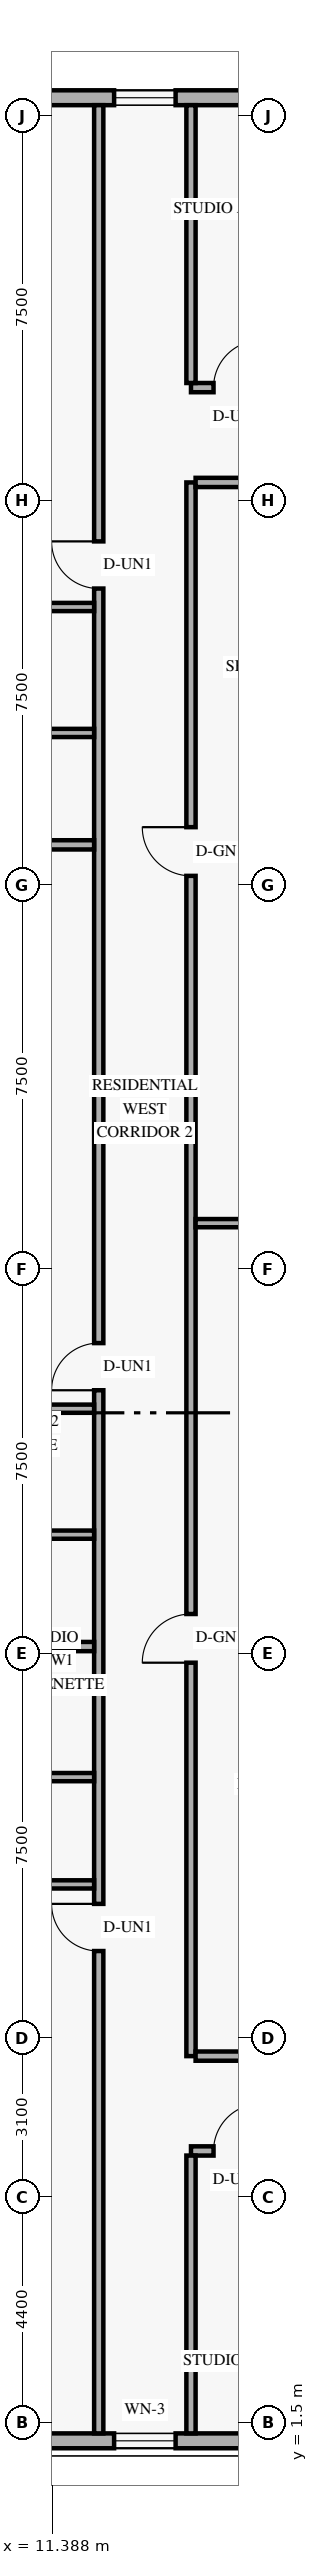
"""IFC4 building model, lengths in metres.
Left out: names, types, materials, properties, quantities, classifications, styles, units other than length and angle.
Written with IfcOpenShell. Run it as: python <this file> out.ifc"""

import sys

from ifc_helpers import new_model, si_unit, direction, frame, frame_2d, origin, place, context, subcontext, project, spatial, rectangle, extrude, element, fill, save


model = new_model("IFC4")
c1 = context("Model", 3, precision=1e-05, world=origin(), true_north=direction((0.0, 1.0)))
c2 = subcontext(c1, "Body", "Model", "MODEL_VIEW")
j1 = project(units=[si_unit("LENGTHUNIT", "METRE"), si_unit("PLANEANGLEUNIT", "RADIAN")], contexts=[c1])
p1 = place(None, origin())
s1 = spatial("IfcSite", under=j1, at=p1, CompositionType="ELEMENT")
p2 = place(p1, origin())
s2 = spatial("IfcBuilding", under=s1, at=p2, CompositionType="ELEMENT")
p3 = place(p2, frame((0.0, 0.0, 64.2)))
s3 = spatial("IfcBuildingStorey", under=s2, at=p3, CompositionType="ELEMENT", Elevation=64.2)
p4 = place(p3, frame((5.42, 1.145, 0.0), z_axis=(0.0, 0.0, 1.0), x_axis=(1.0, 0.0, 0.0)))
e1 = element("IfcWall", 1, at=p4, inside=s3, PredefinedType="SOLIDWALL", context=c2, shape_type="SweptSolid", body=[
    extrude(rectangle(XDim=39.56, YDim=0.29, at=frame_2d((19.78, 0.0))), origin(), (0.0, 0.0, 1.0), 3.36),
])
p5 = place(p4, frame((2.615, 0.0, 0.85)))
e2 = element("IfcOpeningElement", 2, at=p5, cuts=e1, PredefinedType="OPENING", context=c2, shape_type="SweptSolid", body=[
    extrude(rectangle(XDim=1.65, YDim=1.6, at=frame_2d((0.825, 0.8))), frame((0.0, 0.155, 0.0), z_axis=(0.0, -1.0, 0.0), x_axis=(1.0, 0.0, 0.0)), (0.0, 0.0, 1.0), 0.31),
])
p6 = place(p4, frame((7.18, 0.0, 0.85)))
e3 = element("IfcOpeningElement", 3, at=p6, cuts=e1, PredefinedType="OPENING", context=c2, shape_type="SweptSolid", body=[
    extrude(rectangle(XDim=1.2, YDim=1.5, at=frame_2d((0.6, 0.75))), frame((0.0, 0.155, 0.0), z_axis=(0.0, -1.0, 0.0), x_axis=(1.0, 0.0, 0.0)), (0.0, 0.0, 1.0), 0.31),
])
p7 = place(p4, frame((11.906, 0.0, 0.85)))
e4 = element("IfcOpeningElement", 4, at=p7, cuts=e1, PredefinedType="OPENING", context=c2, shape_type="SweptSolid", body=[
    extrude(rectangle(XDim=1.65, YDim=1.6, at=frame_2d((0.825, 0.8))), frame((0.0, 0.155, 0.0), z_axis=(0.0, -1.0, 0.0), x_axis=(1.0, 0.0, 0.0)), (0.0, 0.0, 1.0), 0.31),
])
p8 = place(p4, frame((18.515, 0.0, 0.85)))
e5 = element("IfcOpeningElement", 5, at=p8, cuts=e1, PredefinedType="OPENING", context=c2, shape_type="SweptSolid", body=[
    extrude(rectangle(XDim=1.65, YDim=1.6, at=frame_2d((0.825, 0.8))), frame((0.0, 0.155, 0.0), z_axis=(0.0, -1.0, 0.0), x_axis=(1.0, 0.0, 0.0)), (0.0, 0.0, 1.0), 0.31),
])
p9 = place(p4, frame((25.124, 0.0, 0.85)))
e6 = element("IfcOpeningElement", 6, at=p9, cuts=e1, PredefinedType="OPENING", context=c2, shape_type="SweptSolid", body=[
    extrude(rectangle(XDim=1.65, YDim=1.6, at=frame_2d((0.825, 0.8))), frame((0.0, 0.155, 0.0), z_axis=(0.0, -1.0, 0.0), x_axis=(1.0, 0.0, 0.0)), (0.0, 0.0, 1.0), 0.31),
])
p10 = place(p4, frame((30.465, 0.0, 0.85)))
e7 = element("IfcOpeningElement", 7, at=p10, cuts=e1, PredefinedType="OPENING", context=c2, shape_type="SweptSolid", body=[
    extrude(rectangle(XDim=1.2, YDim=1.5, at=frame_2d((0.6, 0.75))), frame((0.0, 0.155, 0.0), z_axis=(0.0, -1.0, 0.0), x_axis=(1.0, 0.0, 0.0)), (0.0, 0.0, 1.0), 0.31),
])
p11 = place(p4, frame((35.02, 0.0, 0.85)))
e8 = element("IfcOpeningElement", 8, at=p11, cuts=e1, PredefinedType="OPENING", context=c2, shape_type="SweptSolid", body=[
    extrude(rectangle(XDim=1.65, YDim=1.6, at=frame_2d((0.825, 0.8))), frame((0.0, 0.155, 0.0), z_axis=(0.0, -1.0, 0.0), x_axis=(1.0, 0.0, 0.0)), (0.0, 0.0, 1.0), 0.31),
])
p12 = place(p3, frame((44.98, 46.855, 0.0), z_axis=(0.0, 0.0, 1.0), x_axis=(-1.0, 0.0, 0.0)))
e9 = element("IfcWall", 9, at=p12, inside=s3, PredefinedType="SOLIDWALL", context=c2, shape_type="SweptSolid", body=[
    extrude(rectangle(XDim=39.56, YDim=0.29, at=frame_2d((19.78, 0.0))), origin(), (0.0, 0.0, 1.0), 3.36),
])
p13 = place(p12, frame((35.295, 0.0, 0.85)))
e10 = element("IfcOpeningElement", 10, at=p13, cuts=e9, PredefinedType="OPENING", context=c2, shape_type="SweptSolid", body=[
    extrude(rectangle(XDim=1.65, YDim=1.6, at=frame_2d((0.825, 0.8))), frame((0.0, 0.155, 0.0), z_axis=(0.0, -1.0, 0.0), x_axis=(1.0, 0.0, 0.0)), (0.0, 0.0, 1.0), 0.31),
])
p14 = place(p12, frame((31.18, 0.0, 0.85)))
e11 = element("IfcOpeningElement", 11, at=p14, cuts=e9, PredefinedType="OPENING", context=c2, shape_type="SweptSolid", body=[
    extrude(rectangle(XDim=1.2, YDim=1.5, at=frame_2d((0.6, 0.75))), frame((0.0, 0.155, 0.0), z_axis=(0.0, -1.0, 0.0), x_axis=(1.0, 0.0, 0.0)), (0.0, 0.0, 1.0), 0.31),
])
p15 = place(p12, frame((25.684, 0.0, 0.85)))
e12 = element("IfcOpeningElement", 12, at=p15, cuts=e9, PredefinedType="OPENING", context=c2, shape_type="SweptSolid", body=[
    extrude(rectangle(XDim=1.65, YDim=1.6, at=frame_2d((0.825, 0.8))), frame((0.0, 0.155, 0.0), z_axis=(0.0, -1.0, 0.0), x_axis=(1.0, 0.0, 0.0)), (0.0, 0.0, 1.0), 0.31),
])
p16 = place(p12, frame((18.649, 0.0, 0.85)))
e13 = element("IfcOpeningElement", 13, at=p16, cuts=e9, PredefinedType="OPENING", context=c2, shape_type="SweptSolid", body=[
    extrude(rectangle(XDim=1.65, YDim=1.6, at=frame_2d((0.825, 0.8))), frame((0.0, 0.155, 0.0), z_axis=(0.0, -1.0, 0.0), x_axis=(1.0, 0.0, 0.0)), (0.0, 0.0, 1.0), 0.31),
])
p17 = place(p12, frame((12.359, 0.0, 0.85)))
e14 = element("IfcOpeningElement", 14, at=p17, cuts=e9, PredefinedType="OPENING", context=c2, shape_type="SweptSolid", body=[
    extrude(rectangle(XDim=1.65, YDim=1.6, at=frame_2d((0.825, 0.8))), frame((0.0, 0.155, 0.0), z_axis=(0.0, -1.0, 0.0), x_axis=(1.0, 0.0, 0.0)), (0.0, 0.0, 1.0), 0.31),
])
p18 = place(p12, frame((7.895, 0.0, 0.85)))
e15 = element("IfcOpeningElement", 15, at=p18, cuts=e9, PredefinedType="OPENING", context=c2, shape_type="SweptSolid", body=[
    extrude(rectangle(XDim=1.2, YDim=1.5, at=frame_2d((0.6, 0.75))), frame((0.0, 0.155, 0.0), z_axis=(0.0, -1.0, 0.0), x_axis=(1.0, 0.0, 0.0)), (0.0, 0.0, 1.0), 0.31),
])
p19 = place(p12, frame((2.89, 0.0, 0.85)))
e16 = element("IfcOpeningElement", 16, at=p19, cuts=e9, PredefinedType="OPENING", context=c2, shape_type="SweptSolid", body=[
    extrude(rectangle(XDim=1.65, YDim=1.6, at=frame_2d((0.825, 0.8))), frame((0.0, 0.155, 0.0), z_axis=(0.0, -1.0, 0.0), x_axis=(1.0, 0.0, 0.0)), (0.0, 0.0, 1.0), 0.31),
])
p20 = place(p3, frame((14.1, 6.8, 0.0), z_axis=(0.0, 0.0, 1.0), x_axis=(1.0, 0.0, 0.0)))
e17 = element("IfcWall", 17, at=p20, inside=s3, PredefinedType="STANDARD", context=c2, shape_type="SweptSolid", body=[
    extrude(rectangle(XDim=21.32, YDim=0.18, at=frame_2d((10.66, 0.0))), origin(), (0.0, 0.0, 1.0), 2.649),
])
p21 = place(p20, frame((0.44, 0.0, 0.0)))
e18 = element("IfcOpeningElement", 18, at=p21, cuts=e17, PredefinedType="OPENING", context=c2, shape_type="SweptSolid", body=[
    extrude(rectangle(XDim=0.92, YDim=2.15, at=frame_2d((0.46, 1.075))), frame((0.0, 0.1, 0.0), z_axis=(0.0, -1.0, 0.0), x_axis=(1.0, 0.0, 0.0)), (0.0, 0.0, 1.0), 0.2),
])
p22 = place(p20, frame((8.582, 0.0, 0.0)))
e19 = element("IfcOpeningElement", 19, at=p22, cuts=e17, PredefinedType="OPENING", context=c2, shape_type="SweptSolid", body=[
    extrude(rectangle(XDim=0.95, YDim=2.15, at=frame_2d((0.475, 1.075))), frame((0.0, 0.1, 0.0), z_axis=(0.0, -1.0, 0.0), x_axis=(1.0, 0.0, 0.0)), (0.0, 0.0, 1.0), 0.2),
])
p23 = place(p20, frame((13.658, 0.0, 0.0)))
e20 = element("IfcOpeningElement", 20, at=p23, cuts=e17, PredefinedType="OPENING", context=c2, shape_type="SweptSolid", body=[
    extrude(rectangle(XDim=0.92, YDim=2.15, at=frame_2d((0.46, 1.075))), frame((0.0, 0.1, 0.0), z_axis=(0.0, -1.0, 0.0), x_axis=(1.0, 0.0, 0.0)), (0.0, 0.0, 1.0), 0.2),
])
p24 = place(p3, frame((14.1, 41.2, 0.0), z_axis=(0.0, 0.0, 1.0), x_axis=(1.0, 0.0, 0.0)))
e21 = element("IfcWall", 21, at=p24, inside=s3, PredefinedType="STANDARD", context=c2, shape_type="SweptSolid", body=[
    extrude(rectangle(XDim=21.32, YDim=0.18, at=frame_2d((10.66, 0.0))), origin(), (0.0, 0.0, 1.0), 2.649),
])
p25 = place(p24, frame((0.44, 0.0, 0.0)))
e22 = element("IfcOpeningElement", 22, at=p25, cuts=e21, PredefinedType="OPENING", context=c2, shape_type="SweptSolid", body=[
    extrude(rectangle(XDim=0.92, YDim=2.15, at=frame_2d((0.46, 1.075))), frame((0.0, 0.1, 0.0), z_axis=(0.0, -1.0, 0.0), x_axis=(1.0, 0.0, 0.0)), (0.0, 0.0, 1.0), 0.2),
])
p26 = place(p24, frame((10.631, 0.0, 0.0)))
e23 = element("IfcOpeningElement", 23, at=p26, cuts=e21, PredefinedType="OPENING", context=c2, shape_type="SweptSolid", body=[
    extrude(rectangle(XDim=0.95, YDim=2.15, at=frame_2d((0.475, 1.075))), frame((0.0, 0.1, 0.0), z_axis=(0.0, -1.0, 0.0), x_axis=(1.0, 0.0, 0.0)), (0.0, 0.0, 1.0), 0.2),
])
p27 = place(p24, frame((14.511, 0.0, 0.0)))
e24 = element("IfcOpeningElement", 24, at=p27, cuts=e21, PredefinedType="OPENING", context=c2, shape_type="SweptSolid", body=[
    extrude(rectangle(XDim=0.92, YDim=2.15, at=frame_2d((0.46, 1.075))), frame((0.0, 0.1, 0.0), z_axis=(0.0, -1.0, 0.0), x_axis=(1.0, 0.0, 0.0)), (0.0, 0.0, 1.0), 0.2),
])
p28 = place(p3, frame((12.3, 1.29, 0.0), z_axis=(0.0, 0.0, 1.0), x_axis=(0.0, 1.0, 0.0)))
e25 = element("IfcWall", 25, at=p28, inside=s3, PredefinedType="STANDARD", context=c2, shape_type="SweptSolid", body=[
    extrude(rectangle(XDim=45.42, YDim=0.18, at=frame_2d((22.71, 0.0))), origin(), (0.0, 0.0, 1.0), 2.649),
])
p29 = place(p28, frame((9.41, 0.0, 0.0)))
e26 = element("IfcOpeningElement", 26, at=p29, cuts=e25, PredefinedType="OPENING", context=c2, shape_type="SweptSolid", body=[
    extrude(rectangle(XDim=0.92, YDim=2.15, at=frame_2d((0.46, 1.075))), frame((0.0, 0.1, 0.0), z_axis=(0.0, -1.0, 0.0), x_axis=(1.0, 0.0, 0.0)), (0.0, 0.0, 1.0), 0.2),
])
p30 = place(p28, frame((20.35, 0.0, 0.0)))
e27 = element("IfcOpeningElement", 27, at=p30, cuts=e25, PredefinedType="OPENING", context=c2, shape_type="SweptSolid", body=[
    extrude(rectangle(XDim=0.92, YDim=2.15, at=frame_2d((0.46, 1.075))), frame((0.0, 0.1, 0.0), z_axis=(0.0, -1.0, 0.0), x_axis=(1.0, 0.0, 0.0)), (0.0, 0.0, 1.0), 0.2),
])
p31 = place(p28, frame((35.99, 0.0, 0.0)))
e28 = element("IfcOpeningElement", 28, at=p31, cuts=e25, PredefinedType="OPENING", context=c2, shape_type="SweptSolid", body=[
    extrude(rectangle(XDim=0.92, YDim=2.15, at=frame_2d((0.46, 1.075))), frame((0.0, 0.1, 0.0), z_axis=(0.0, -1.0, 0.0), x_axis=(1.0, 0.0, 0.0)), (0.0, 0.0, 1.0), 0.2),
])
p32 = place(p3, frame((14.1, 8.65, 0.0), z_axis=(0.0, 0.0, 1.0), x_axis=(0.0, 1.0, 0.0)))
e29 = element("IfcWall", 29, at=p32, inside=s3, PredefinedType="STANDARD", context=c2, shape_type="SweptSolid", body=[
    extrude(rectangle(XDim=30.7, YDim=0.18, at=frame_2d((15.35, 0.0))), origin(), (0.0, 0.0, 1.0), 2.649),
])
p33 = place(p32, frame((7.675, 0.0, 0.0)))
e30 = element("IfcOpeningElement", 30, at=p33, cuts=e29, PredefinedType="OPENING", context=c2, shape_type="SweptSolid", body=[
    extrude(rectangle(XDim=0.95, YDim=2.15, at=frame_2d((0.475, 1.075))), frame((0.0, 0.1, 0.0), z_axis=(0.0, -1.0, 0.0), x_axis=(1.0, 0.0, 0.0)), (0.0, 0.0, 1.0), 0.2),
])
p34 = place(p32, frame((23.025, 0.0, 0.0)))
e31 = element("IfcOpeningElement", 31, at=p34, cuts=e29, PredefinedType="OPENING", context=c2, shape_type="SweptSolid", body=[
    extrude(rectangle(XDim=0.95, YDim=2.15, at=frame_2d((0.475, 1.075))), frame((0.0, 0.1, 0.0), z_axis=(0.0, -1.0, 0.0), x_axis=(1.0, 0.0, 0.0)), (0.0, 0.0, 1.0), 0.2),
])
for number, where, z_axis, x_axis in (
    (32, (14.19, 8.65, 0.0), (0.0, 0.0, 1.0), (1.0, 0.0, 0.0)),
    (33, (14.19, 39.35, 0.0), (0.0, 0.0, 1.0), (1.0, 0.0, 0.0)),
):
    element("IfcWall", number, at=place(p3, frame(where, z_axis=z_axis, x_axis=x_axis)), inside=s3, PredefinedType="STANDARD", context=c2, shape_type="SweptSolid", body=[
        extrude(rectangle(XDim=7.37, YDim=0.18, at=frame_2d((3.685, 0.0))), origin(), (0.0, 0.0, 1.0), 2.649),
    ])
for number, where, z_axis, x_axis in (
    (34, (14.1, 1.29, 0.0), (0.0, 0.0, 1.0), (0.0, 1.0, 0.0)),
    (35, (14.1, 41.29, 0.0), (0.0, 0.0, 1.0), (0.0, 1.0, 0.0)),
):
    element("IfcWall", number, at=place(p3, frame(where, z_axis=z_axis, x_axis=x_axis)), inside=s3, PredefinedType="PARTITIONING", context=c2, shape_type="SweptSolid", body=[
        extrude(rectangle(XDim=5.42, YDim=0.18, at=frame_2d((2.71, 0.0))), origin(), (0.0, 0.0, 1.0), 2.809),
    ])
p35 = place(p3, frame((9.68, 12.0, 0.0), z_axis=(0.0, 0.0, 1.0), x_axis=(1.0, 0.0, 0.0)))
e36 = element("IfcWall", 36, at=p35, inside=s3, PredefinedType="PLUMBINGWALL", context=c2, shape_type="SweptSolid", body=[
    extrude(rectangle(XDim=2.53, YDim=0.16, at=frame_2d((1.265, 0.0))), origin(), (0.0, 0.0, 1.0), 2.649),
])
p36 = place(p3, frame((9.84, 14.093, 0.0), z_axis=(0.0, 0.0, 1.0), x_axis=(1.0, 0.0, 0.0)))
e37 = element("IfcWall", 37, at=p36, inside=s3, PredefinedType="PLUMBINGWALL", context=c2, shape_type="SweptSolid", body=[
    extrude(rectangle(XDim=2.37, YDim=0.16, at=frame_2d((1.185, 0.0))), origin(), (0.0, 0.0, 1.0), 2.649),
])
p37 = place(p3, frame((2.09, 16.64, 0.0), z_axis=(0.0, 0.0, 1.0), x_axis=(1.0, 0.0, 0.0)))
e38 = element("IfcWall", 38, at=p37, inside=s3, PredefinedType="PARTITIONING", context=c2, shape_type="SweptSolid", body=[
    extrude(rectangle(XDim=10.12, YDim=0.18, at=frame_2d((5.06, 0.0))), origin(), (0.0, 0.0, 1.0), 2.649),
])
p38 = place(p3, frame((8.43, 21.28, 0.0), z_axis=(0.0, 0.0, 1.0), x_axis=(1.0, 0.0, 0.0)))
e39 = element("IfcWall", 39, at=p38, inside=s3, PredefinedType="PLUMBINGWALL", context=c2, shape_type="SweptSolid", body=[
    extrude(rectangle(XDim=3.78, YDim=0.16, at=frame_2d((1.89, 0.0))), origin(), (0.0, 0.0, 1.0), 2.649),
])
p39 = place(p3, frame((8.59, 18.823, 0.0), z_axis=(0.0, 0.0, 1.0), x_axis=(1.0, 0.0, 0.0)))
e40 = element("IfcWall", 40, at=p39, inside=s3, PredefinedType="PLUMBINGWALL", context=c2, shape_type="SweptSolid", body=[
    extrude(rectangle(XDim=3.62, YDim=0.16, at=frame_2d((1.81, 0.0))), origin(), (0.0, 0.0, 1.0), 2.649),
])
p40 = place(p3, frame((2.09, 32.28, 0.0), z_axis=(0.0, 0.0, 1.0), x_axis=(1.0, 0.0, 0.0)))
e41 = element("IfcWall", 41, at=p40, inside=s3, PredefinedType="PARTITIONING", context=c2, shape_type="SweptSolid", body=[
    extrude(rectangle(XDim=10.12, YDim=0.18, at=frame_2d((5.06, 0.0))), origin(), (0.0, 0.0, 1.0), 2.649),
])
p41 = place(p3, frame((9.528, 36.92, 0.0), z_axis=(0.0, 0.0, 1.0), x_axis=(1.0, 0.0, 0.0)))
e42 = element("IfcWall", 42, at=p41, inside=s3, PredefinedType="PLUMBINGWALL", context=c2, shape_type="SweptSolid", body=[
    extrude(rectangle(XDim=2.682, YDim=0.16, at=frame_2d((1.341, 0.0))), origin(), (0.0, 0.0, 1.0), 2.649),
])
p42 = place(p3, frame((9.688, 34.463, 0.0), z_axis=(0.0, 0.0, 1.0), x_axis=(1.0, 0.0, 0.0)))
e43 = element("IfcWall", 43, at=p42, inside=s3, PredefinedType="PLUMBINGWALL", context=c2, shape_type="SweptSolid", body=[
    extrude(rectangle(XDim=2.522, YDim=0.16, at=frame_2d((1.261, 0.0))), origin(), (0.0, 0.0, 1.0), 2.649),
])
p43 = place(p3, frame((14.19, 24.9, 0.0), z_axis=(0.0, 0.0, 1.0), x_axis=(1.0, 0.0, 0.0)))
e44 = element("IfcWall", 44, at=p43, inside=s3, PredefinedType="PARTITIONING", context=c2, shape_type="SweptSolid", body=[
    extrude(rectangle(XDim=7.37, YDim=0.16, at=frame_2d((3.685, 0.0))), origin(), (0.0, 0.0, 1.0), 2.649),
])
p44 = place(p6, origin())
e45 = element("IfcWindow", 45, at=p44, inside=s3, PartitioningType="SINGLE_PANEL", PredefinedType="WINDOW", context=c2, shape_type="SweptSolid", body=[
    extrude(rectangle(XDim=1.2, YDim=1.5, at=frame_2d((0.6, 0.75))), frame((0.0, 0.03, 0.0), z_axis=(0.0, -1.0, 0.0), x_axis=(1.0, 0.0, 0.0)), (0.0, 0.0, 1.0), 0.06),
])
fill(e3, e45)
p45 = place(p14, origin())
e46 = element("IfcWindow", 46, at=p45, inside=s3, PartitioningType="SINGLE_PANEL", PredefinedType="WINDOW", context=c2, shape_type="SweptSolid", body=[
    extrude(rectangle(XDim=1.2, YDim=1.5, at=frame_2d((0.6, 0.75))), frame((0.0, 0.03, 0.0), z_axis=(0.0, -1.0, 0.0), x_axis=(1.0, 0.0, 0.0)), (0.0, 0.0, 1.0), 0.06),
])
fill(e11, e46)
p46 = place(p29, origin())
e47 = element("IfcDoor", 47, at=p46, inside=s3, OperationType="SINGLE_SWING_RIGHT", PredefinedType="DOOR", context=c2, shape_type="SweptSolid", body=[
    extrude(rectangle(XDim=0.92, YDim=2.15, at=frame_2d((0.46, 1.075))), frame((0.0, 0.025, 0.0), z_axis=(0.0, -1.0, 0.0), x_axis=(1.0, 0.0, 0.0)), (0.0, 0.0, 1.0), 0.05),
])
fill(e26, e47)
p47 = place(p30, origin())
e48 = element("IfcDoor", 48, at=p47, inside=s3, OperationType="SINGLE_SWING_LEFT", PredefinedType="DOOR", context=c2, shape_type="SweptSolid", body=[
    extrude(rectangle(XDim=0.92, YDim=2.15, at=frame_2d((0.46, 1.075))), frame((0.0, 0.025, 0.0), z_axis=(0.0, -1.0, 0.0), x_axis=(1.0, 0.0, 0.0)), (0.0, 0.0, 1.0), 0.05),
])
fill(e27, e48)
p48 = place(p31, origin())
e49 = element("IfcDoor", 49, at=p48, inside=s3, OperationType="SINGLE_SWING_RIGHT", PredefinedType="DOOR", context=c2, shape_type="SweptSolid", body=[
    extrude(rectangle(XDim=0.92, YDim=2.15, at=frame_2d((0.46, 1.075))), frame((0.0, 0.025, 0.0), z_axis=(0.0, -1.0, 0.0), x_axis=(1.0, 0.0, 0.0)), (0.0, 0.0, 1.0), 0.05),
])
fill(e28, e49)
p49 = place(p33, origin())
e50 = element("IfcDoor", 50, at=p49, inside=s3, OperationType="SINGLE_SWING_LEFT", PredefinedType="DOOR", context=c2, shape_type="SweptSolid", body=[
    extrude(rectangle(XDim=0.95, YDim=2.15, at=frame_2d((0.475, 1.075))), frame((0.0, 0.025, 0.0), z_axis=(0.0, -1.0, 0.0), x_axis=(1.0, 0.0, 0.0)), (0.0, 0.0, 1.0), 0.05),
])
fill(e30, e50)
p50 = place(p34, origin())
e51 = element("IfcDoor", 51, at=p50, inside=s3, OperationType="SINGLE_SWING_RIGHT", PredefinedType="DOOR", context=c2, shape_type="SweptSolid", body=[
    extrude(rectangle(XDim=0.95, YDim=2.15, at=frame_2d((0.475, 1.075))), frame((0.0, 0.025, 0.0), z_axis=(0.0, -1.0, 0.0), x_axis=(1.0, 0.0, 0.0)), (0.0, 0.0, 1.0), 0.05),
])
fill(e31, e51)
p51 = place(p21, origin())
e52 = element("IfcDoor", 52, at=p51, inside=s3, OperationType="SINGLE_SWING_RIGHT", PredefinedType="DOOR", context=c2, shape_type="SweptSolid", body=[
    extrude(rectangle(XDim=0.92, YDim=2.15, at=frame_2d((0.46, 1.075))), frame((0.0, 0.025, 0.0), z_axis=(0.0, -1.0, 0.0), x_axis=(1.0, 0.0, 0.0)), (0.0, 0.0, 1.0), 0.05),
])
fill(e18, e52)
p52 = place(p25, origin())
e53 = element("IfcDoor", 53, at=p52, inside=s3, OperationType="SINGLE_SWING_RIGHT", PredefinedType="DOOR", context=c2, shape_type="SweptSolid", body=[
    extrude(rectangle(XDim=0.92, YDim=2.15, at=frame_2d((0.46, 1.075))), frame((0.0, 0.025, 0.0), z_axis=(0.0, -1.0, 0.0), x_axis=(1.0, 0.0, 0.0)), (0.0, 0.0, 1.0), 0.05),
])
fill(e22, e53)
save(model, sys.argv[1])
